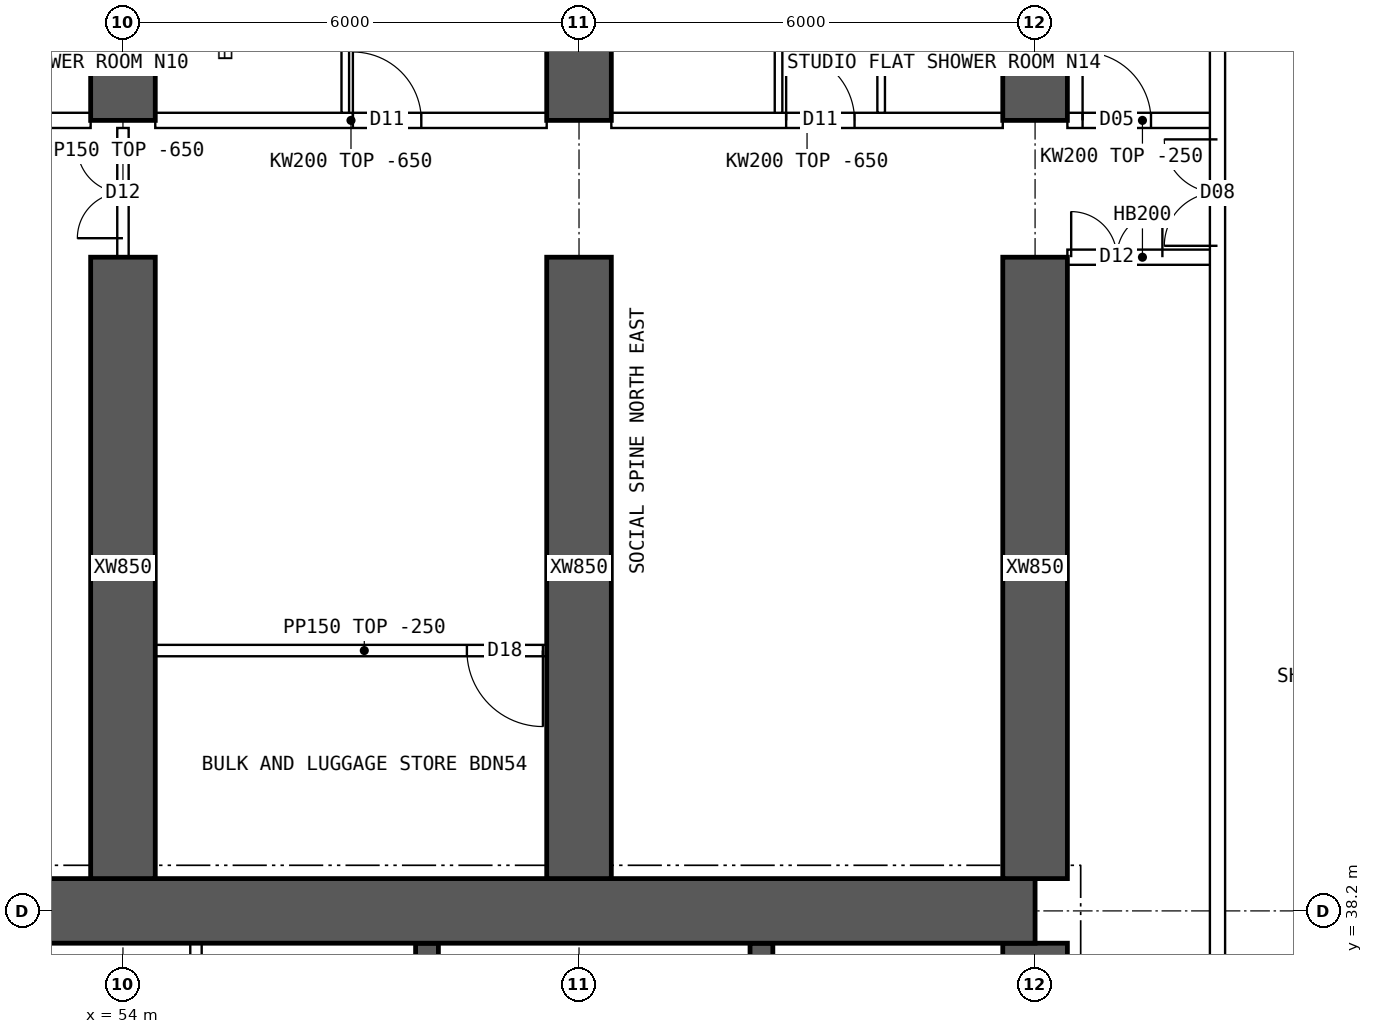
"""IFC4 building model, lengths in metres.
Left out: names, types, materials, properties, quantities, classifications, styles, units other than length and angle.
Written with IfcOpenShell. Run it as: python <this file> out.ifc"""

import sys

from ifc_helpers import new_model, si_unit, direction, frame, frame_2d, origin, place, context, subcontext, project, spatial, polyline, rectangle, outline, extrude, element, fill, save


model = new_model("IFC4")
c1 = context("Model", 3, precision=1e-05, world=origin(), true_north=direction((0.0, 1.0)))
c2 = subcontext(c1, "Body", "Model", "MODEL_VIEW")
j1 = project(units=[si_unit("LENGTHUNIT", "METRE"), si_unit("PLANEANGLEUNIT", "RADIAN")], contexts=[c1])
p1 = place(None, origin())
s1 = spatial("IfcSite", under=j1, at=p1, CompositionType="ELEMENT")
p2 = place(p1, origin())
s2 = spatial("IfcBuilding", under=s1, at=p2, CompositionType="ELEMENT")
p3 = place(p2, frame((0.0, 0.0, 186.1)))
s3 = spatial("IfcBuildingStorey", under=s2, at=p3, CompositionType="ELEMENT", Elevation=186.1)
p4 = place(p3, frame((18.0, 38.2, 0.0), z_axis=(0.0, 0.0, 1.0), x_axis=(1.0, 0.0, 0.0)))
e1 = element("IfcWall", 1, at=p4, inside=s3, PredefinedType="SHEAR", context=c2, shape_type="SweptSolid", body=[
    extrude(rectangle(XDim=48.0, YDim=0.85, at=frame_2d((24.0, 0.0))), origin(), (0.0, 0.0, 1.0), 3.75),
])
p5 = place(p3, frame((66.0, 26.225, 0.0), z_axis=(0.0, 0.0, 1.0), x_axis=(0.0, 1.0, 0.0)))
e2 = element("IfcWall", 2, at=p5, inside=s3, PredefinedType="SHEAR", context=c2, shape_type="SweptSolid", body=[
    extrude(rectangle(XDim=11.55, YDim=0.85, at=frame_2d((5.775, 0.0))), origin(), (0.0, 0.0, 1.0), 3.75),
])
p6 = place(p5, frame((5.075, 0.0, 0.0)))
e3 = element("IfcOpeningElement", 3, at=p6, cuts=e2, PredefinedType="OPENING", context=c2, shape_type="SweptSolid", body=[
    extrude(rectangle(XDim=1.2, YDim=2.1, at=frame_2d((0.6, 1.05))), frame((0.0, 0.435, 0.0), z_axis=(0.0, -1.0, 0.0), x_axis=(1.0, 0.0, 0.0)), (0.0, 0.0, 1.0), 0.87),
])
for number, where, z_axis, x_axis in (
    (4, (62.4, 34.75, 0.0), (0.0, 0.0, 1.0), (0.0, 1.0, 0.0)),
    (5, (58.0, 34.75, 0.0), (0.0, 0.0, 1.0), (0.0, 1.0, 0.0)),
):
    element("IfcWall", number, at=place(p3, frame(where, z_axis=z_axis, x_axis=x_axis)), inside=s3, PredefinedType="SHEAR", context=c2, shape_type="SweptSolid", body=[
        extrude(rectangle(XDim=3.025, YDim=0.3, at=frame_2d((1.512, 0.0))), origin(), (0.0, 0.0, 1.0), 3.75),
    ])
p7 = place(p3, frame((54.0, 48.6, 0.0), z_axis=(0.0, 0.0, 1.0), x_axis=(0.0, 1.0, 0.0)))
e6 = element("IfcWall", 6, at=p7, inside=s3, PredefinedType="SHEAR", context=c2, shape_type="SweptSolid", body=[
    extrude(rectangle(XDim=5.4, YDim=0.85, at=frame_2d((2.7, 0.0))), origin(), (0.0, 0.0, 1.0), 3.75),
])
p8 = place(p3, frame((54.0, 38.625, 0.0), z_axis=(0.0, 0.0, 1.0), x_axis=(0.0, 1.0, 0.0)))
e7 = element("IfcWall", 7, at=p8, inside=s3, PredefinedType="SHEAR", context=c2, shape_type="SweptSolid", body=[
    extrude(rectangle(XDim=8.175, YDim=0.85, at=frame_2d((4.087, 0.0))), origin(), (0.0, 0.0, 1.0), 3.75),
])
p9 = place(p3, frame((60.0, 48.6, 0.0), z_axis=(0.0, 0.0, 1.0), x_axis=(0.0, 1.0, 0.0)))
e8 = element("IfcWall", 8, at=p9, inside=s3, PredefinedType="SHEAR", context=c2, shape_type="SweptSolid", body=[
    extrude(rectangle(XDim=5.4, YDim=0.85, at=frame_2d((2.7, 0.0))), origin(), (0.0, 0.0, 1.0), 3.75),
])
p10 = place(p3, frame((60.0, 38.625, 0.0), z_axis=(0.0, 0.0, 1.0), x_axis=(0.0, 1.0, 0.0)))
e9 = element("IfcWall", 9, at=p10, inside=s3, PredefinedType="SHEAR", context=c2, shape_type="SweptSolid", body=[
    extrude(rectangle(XDim=8.175, YDim=0.85, at=frame_2d((4.087, 0.0))), origin(), (0.0, 0.0, 1.0), 3.75),
])
p11 = place(p3, frame((66.0, 48.6, 0.0), z_axis=(0.0, 0.0, 1.0), x_axis=(0.0, 1.0, 0.0)))
e10 = element("IfcWall", 10, at=p11, inside=s3, PredefinedType="SHEAR", context=c2, shape_type="SweptSolid", body=[
    extrude(rectangle(XDim=5.4, YDim=0.85, at=frame_2d((2.7, 0.0))), origin(), (0.0, 0.0, 1.0), 3.75),
])
p12 = place(p3, frame((66.0, 38.625, 0.0), z_axis=(0.0, 0.0, 1.0), x_axis=(0.0, 1.0, 0.0)))
e11 = element("IfcWall", 11, at=p12, inside=s3, PredefinedType="SHEAR", context=c2, shape_type="SweptSolid", body=[
    extrude(rectangle(XDim=8.175, YDim=0.85, at=frame_2d((4.087, 0.0))), origin(), (0.0, 0.0, 1.0), 3.75),
])
p13 = place(p3, frame((54.961, 34.75, 0.0), z_axis=(0.0, 0.0, 1.0), x_axis=(0.0, 1.0, 0.0)))
e12 = element("IfcWall", 12, at=p13, inside=s3, PredefinedType="SOLIDWALL", context=c2, shape_type="SweptSolid", body=[
    extrude(rectangle(XDim=3.025, YDim=0.15, at=frame_2d((1.512, 0.0))), origin(), (0.0, 0.0, 1.0), 3.5),
])
p14 = place(p3, frame((48.425, 48.6, 0.0), z_axis=(0.0, 0.0, 1.0), x_axis=(1.0, 0.0, 0.0)))
e13 = element("IfcWall", 13, at=p14, inside=s3, PredefinedType="SOLIDWALL", context=c2, shape_type="SweptSolid", body=[
    extrude(outline(polyline([(0.0, 0.0), (5.15, 0.0), (5.15, 3.1), (0.0, 3.1), (0.0, 0.0)])), frame((0.0, 0.1, 0.0), z_axis=(0.0, -1.0, 0.0), x_axis=(1.0, 0.0, 0.0)), (0.0, 0.0, 1.0), 0.2),
])
p15 = place(p14, frame((2.3, 0.0, 0.0)))
e14 = element("IfcOpeningElement", 14, at=p15, cuts=e13, PredefinedType="OPENING", context=c2, shape_type="SweptSolid", body=[
    extrude(rectangle(XDim=0.9, YDim=2.1, at=frame_2d((0.45, 1.05))), frame((0.0, 0.11, 0.0), z_axis=(0.0, -1.0, 0.0), x_axis=(1.0, 0.0, 0.0)), (0.0, 0.0, 1.0), 0.22),
])
p16 = place(p3, frame((54.425, 48.6, 0.0), z_axis=(0.0, 0.0, 1.0), x_axis=(1.0, 0.0, 0.0)))
e15 = element("IfcWall", 15, at=p16, inside=s3, PredefinedType="SOLIDWALL", context=c2, shape_type="SweptSolid", body=[
    extrude(outline(polyline([(0.0, 0.0), (5.15, 0.0), (5.15, 3.1), (0.0, 3.1), (0.0, 0.0)])), frame((0.0, 0.1, 0.0), z_axis=(0.0, -1.0, 0.0), x_axis=(1.0, 0.0, 0.0)), (0.0, 0.0, 1.0), 0.2),
])
p17 = place(p16, frame((2.6, 0.0, 0.0)))
e16 = element("IfcOpeningElement", 16, at=p17, cuts=e15, PredefinedType="OPENING", context=c2, shape_type="SweptSolid", body=[
    extrude(rectangle(XDim=0.9, YDim=2.1, at=frame_2d((0.45, 1.05))), frame((0.0, 0.11, 0.0), z_axis=(0.0, -1.0, 0.0), x_axis=(1.0, 0.0, 0.0)), (0.0, 0.0, 1.0), 0.22),
])
p18 = place(p3, frame((60.425, 48.6, 0.0), z_axis=(0.0, 0.0, 1.0), x_axis=(1.0, 0.0, 0.0)))
e17 = element("IfcWall", 17, at=p18, inside=s3, PredefinedType="SOLIDWALL", context=c2, shape_type="SweptSolid", body=[
    extrude(outline(polyline([(0.0, 0.0), (5.15, 0.0), (5.15, 3.1), (0.0, 3.1), (0.0, 0.0)])), frame((0.0, 0.1, 0.0), z_axis=(0.0, -1.0, 0.0), x_axis=(1.0, 0.0, 0.0)), (0.0, 0.0, 1.0), 0.2),
])
p19 = place(p18, frame((2.3, 0.0, 0.0)))
e18 = element("IfcOpeningElement", 18, at=p19, cuts=e17, PredefinedType="OPENING", context=c2, shape_type="SweptSolid", body=[
    extrude(rectangle(XDim=0.9, YDim=2.1, at=frame_2d((0.45, 1.05))), frame((0.0, 0.11, 0.0), z_axis=(0.0, -1.0, 0.0), x_axis=(1.0, 0.0, 0.0)), (0.0, 0.0, 1.0), 0.22),
])
p20 = place(p3, frame((66.425, 48.6, 0.0), z_axis=(0.0, 0.0, 1.0), x_axis=(1.0, 0.0, 0.0)))
e19 = element("IfcWall", 19, at=p20, inside=s3, PredefinedType="SOLIDWALL", context=c2, shape_type="SweptSolid", body=[
    extrude(rectangle(XDim=1.975, YDim=0.2, at=frame_2d((0.987, 0.0))), origin(), (0.0, 0.0, 1.0), 3.5),
])
p21 = place(p20, frame((0.2, 0.0, 0.0)))
e20 = element("IfcOpeningElement", 20, at=p21, cuts=e19, PredefinedType="OPENING", context=c2, shape_type="SweptSolid", body=[
    extrude(rectangle(XDim=0.9, YDim=2.1, at=frame_2d((0.45, 1.05))), frame((0.0, 0.11, 0.0), z_axis=(0.0, -1.0, 0.0), x_axis=(1.0, 0.0, 0.0)), (0.0, 0.0, 1.0), 0.22),
])
p22 = place(p3, frame((66.425, 46.8, 0.0), z_axis=(0.0, 0.0, 1.0), x_axis=(1.0, 0.0, 0.0)))
e21 = element("IfcWall", 21, at=p22, inside=s3, PredefinedType="SOLIDWALL", context=c2, shape_type="SweptSolid", body=[
    extrude(rectangle(XDim=1.975, YDim=0.2, at=frame_2d((0.987, 0.0))), origin(), (0.0, 0.0, 1.0), 3.5),
])
p23 = place(p22, frame((0.05, 0.0, 0.0)))
e22 = element("IfcOpeningElement", 22, at=p23, cuts=e21, PredefinedType="OPENING", context=c2, shape_type="SweptSolid", body=[
    extrude(rectangle(XDim=1.2, YDim=2.1, at=frame_2d((0.6, 1.05))), frame((0.0, 0.11, 0.0), z_axis=(0.0, -1.0, 0.0), x_axis=(1.0, 0.0, 0.0)), (0.0, 0.0, 1.0), 0.22),
])
p24 = place(p3, frame((56.925, 51.85, 0.0), z_axis=(0.0, 0.0, 1.0), x_axis=(0.0, -1.0, 0.0)))
e23 = element("IfcWall", 23, at=p24, inside=s3, PredefinedType="PARTITIONING", context=c2, shape_type="SweptSolid", body=[
    extrude(outline(polyline([(0.0, 0.0), (3.15, 0.0), (3.15, 3.1), (3.102, 3.1), (3.1, 3.5), (0.0, 3.5), (0.0, 0.0)])), frame((0.0, 0.05, 0.0), z_axis=(0.0, -1.0, 0.0), x_axis=(1.0, 0.0, 0.0)), (0.0, 0.0, 1.0), 0.1),
])
p25 = place(p3, frame((62.625, 51.05, 0.0), z_axis=(0.0, 0.0, 1.0), x_axis=(0.0, -1.0, 0.0)))
e24 = element("IfcWall", 24, at=p25, inside=s3, PredefinedType="PARTITIONING", context=c2, shape_type="SweptSolid", body=[
    extrude(outline(polyline([(0.0, 0.0), (2.35, 0.0), (2.35, 3.1), (2.302, 3.1), (2.3, 3.5), (0.0, 3.5), (0.0, 0.0)])), frame((0.0, 0.05, 0.0), z_axis=(0.0, -1.0, 0.0), x_axis=(1.0, 0.0, 0.0)), (0.0, 0.0, 1.0), 0.1),
])
p26 = place(p3, frame((63.975, 51.05, 0.0), z_axis=(0.0, 0.0, 1.0), x_axis=(0.0, -1.0, 0.0)))
e25 = element("IfcWall", 25, at=p26, inside=s3, PredefinedType="PARTITIONING", context=c2, shape_type="SweptSolid", body=[
    extrude(outline(polyline([(0.0, 0.0), (2.35, 0.0), (2.35, 3.1), (2.302, 3.1), (2.3, 3.5), (0.0, 3.5), (0.0, 0.0)])), frame((0.0, 0.05, 0.0), z_axis=(0.0, -1.0, 0.0), x_axis=(1.0, 0.0, 0.0)), (0.0, 0.0, 1.0), 0.1),
])
p27 = place(p26, frame((0.8, 0.0, 0.0)))
e26 = element("IfcOpeningElement", 26, at=p27, cuts=e25, PredefinedType="OPENING", context=c2, shape_type="SweptSolid", body=[
    extrude(rectangle(XDim=0.8, YDim=2.1, at=frame_2d((0.4, 1.05))), frame((0.0, 0.06, 0.0), z_axis=(0.0, -1.0, 0.0), x_axis=(1.0, 0.0, 0.0)), (0.0, 0.0, 1.0), 0.12),
])
p28 = place(p3, frame((59.925, 41.625, 0.0), z_axis=(0.0, 0.0, 1.0), x_axis=(-1.0, 0.0, 0.0)))
e27 = element("IfcWall", 27, at=p28, inside=s3, PredefinedType="PARTITIONING", context=c2, shape_type="SweptSolid", body=[
    extrude(rectangle(XDim=5.5, YDim=0.15, at=frame_2d((2.75, 0.0))), origin(), (0.0, 0.0, 1.0), 3.5),
])
p29 = place(p28, frame((0.4, 0.0, 0.0)))
e28 = element("IfcOpeningElement", 28, at=p29, cuts=e27, PredefinedType="OPENING", context=c2, shape_type="SweptSolid", body=[
    extrude(rectangle(XDim=1.0, YDim=2.1, at=frame_2d((0.5, 1.05))), frame((0.0, 0.085, 0.0), z_axis=(0.0, -1.0, 0.0), x_axis=(1.0, 0.0, 0.0)), (0.0, 0.0, 1.0), 0.17),
])
p30 = place(p3, frame((54.0, 46.8, 0.0), z_axis=(0.0, 0.0, 1.0), x_axis=(0.0, 1.0, 0.0)))
e29 = element("IfcWall", 29, at=p30, inside=s3, PredefinedType="PARTITIONING", context=c2, shape_type="SweptSolid", body=[
    extrude(outline(polyline([(0.0, 0.0), (1.7, 0.0), (1.7, 3.1), (0.0, 3.1), (0.0, 0.0)])), frame((0.0, 0.075, 0.0), z_axis=(0.0, -1.0, 0.0), x_axis=(1.0, 0.0, 0.0)), (0.0, 0.0, 1.0), 0.15),
])
p31 = place(p30, frame((0.25, 0.0, 0.0)))
e30 = element("IfcOpeningElement", 30, at=p31, cuts=e29, PredefinedType="OPENING", context=c2, shape_type="SweptSolid", body=[
    extrude(rectangle(XDim=1.2, YDim=2.1, at=frame_2d((0.6, 1.05))), frame((0.0, 0.085, 0.0), z_axis=(0.0, -1.0, 0.0), x_axis=(1.0, 0.0, 0.0)), (0.0, 0.0, 1.0), 0.17),
])
p32 = place(p3, frame((68.4, 10.446, 0.0), z_axis=(0.0, 0.0, 1.0), x_axis=(0.0, 1.0, 0.0)))
e31 = element("IfcWall", 31, at=p32, inside=s3, PredefinedType="SOLIDWALL", context=c2, shape_type="SweptSolid", body=[
    extrude(rectangle(XDim=43.107, YDim=0.2, at=frame_2d((21.554, 0.0))), origin(), (0.0, 0.0, 1.0), 3.5),
])
p33 = place(p32, frame((5.104, 0.0, 0.0)))
e32 = element("IfcOpeningElement", 32, at=p33, cuts=e31, PredefinedType="OPENING", context=c2, shape_type="SweptSolid", body=[
    extrude(rectangle(XDim=1.4, YDim=2.1, at=frame_2d((0.7, 1.05))), frame((0.0, 0.11, 0.0), z_axis=(0.0, -1.0, 0.0), x_axis=(1.0, 0.0, 0.0)), (0.0, 0.0, 1.0), 0.22),
])
p34 = place(p32, frame((36.504, 0.0, 0.0)))
e33 = element("IfcOpeningElement", 33, at=p34, cuts=e31, PredefinedType="OPENING", context=c2, shape_type="SweptSolid", body=[
    extrude(rectangle(XDim=1.4, YDim=2.1, at=frame_2d((0.7, 1.05))), frame((0.0, 0.11, 0.0), z_axis=(0.0, -1.0, 0.0), x_axis=(1.0, 0.0, 0.0)), (0.0, 0.0, 1.0), 0.22),
])
p35 = place(p23, origin())
e34 = element("IfcDoor", 34, at=p35, inside=s3, OperationType="DOUBLE_DOOR_SINGLE_SWING", PredefinedType="DOOR", context=c2, shape_type="SweptSolid", body=[
    extrude(rectangle(XDim=1.2, YDim=2.1, at=frame_2d((0.6, 1.05))), frame((0.0, 0.025, 0.0), z_axis=(0.0, -1.0, 0.0), x_axis=(1.0, 0.0, 0.0)), (0.0, 0.0, 1.0), 0.05),
])
fill(e22, e34)
p36 = place(p17, origin())
e35 = element("IfcDoor", 35, at=p36, inside=s3, OperationType="SINGLE_SWING_LEFT", PredefinedType="DOOR", context=c2, shape_type="SweptSolid", body=[
    extrude(rectangle(XDim=0.9, YDim=2.1, at=frame_2d((0.45, 1.05))), frame((0.0, 0.025, 0.0), z_axis=(0.0, -1.0, 0.0), x_axis=(1.0, 0.0, 0.0)), (0.0, 0.0, 1.0), 0.05),
])
fill(e16, e35)
p37 = place(p27, origin())
e36 = element("IfcDoor", 36, at=p37, inside=s3, OperationType="SINGLE_SWING_RIGHT", PredefinedType="DOOR", context=c2, shape_type="SweptSolid", body=[
    extrude(rectangle(XDim=0.8, YDim=2.1, at=frame_2d((0.4, 1.05))), frame((0.0, 0.025, 0.0), z_axis=(0.0, -1.0, 0.0), x_axis=(1.0, 0.0, 0.0)), (0.0, 0.0, 1.0), 0.05),
])
fill(e26, e36)
p38 = place(p19, origin())
e37 = element("IfcDoor", 37, at=p38, inside=s3, OperationType="SINGLE_SWING_LEFT", PredefinedType="DOOR", context=c2, shape_type="SweptSolid", body=[
    extrude(rectangle(XDim=0.9, YDim=2.1, at=frame_2d((0.45, 1.05))), frame((0.0, 0.025, 0.0), z_axis=(0.0, -1.0, 0.0), x_axis=(1.0, 0.0, 0.0)), (0.0, 0.0, 1.0), 0.05),
])
fill(e18, e37)
p39 = place(p29, origin())
e38 = element("IfcDoor", 38, at=p39, inside=s3, OperationType="SINGLE_SWING_LEFT", PredefinedType="DOOR", context=c2, shape_type="SweptSolid", body=[
    extrude(rectangle(XDim=1.0, YDim=2.1, at=frame_2d((0.5, 1.05))), frame((0.0, 0.025, 0.0), z_axis=(0.0, -1.0, 0.0), x_axis=(1.0, 0.0, 0.0)), (0.0, 0.0, 1.0), 0.05),
])
fill(e28, e38)
p40 = place(p31, origin())
e39 = element("IfcDoor", 39, at=p40, inside=s3, OperationType="DOUBLE_DOOR_SINGLE_SWING", PredefinedType="DOOR", context=c2, shape_type="SweptSolid", body=[
    extrude(rectangle(XDim=1.2, YDim=2.1, at=frame_2d((0.6, 1.05))), frame((0.0, 0.025, 0.0), z_axis=(0.0, -1.0, 0.0), x_axis=(1.0, 0.0, 0.0)), (0.0, 0.0, 1.0), 0.05),
])
fill(e30, e39)
p41 = place(p34, origin())
e40 = element("IfcDoor", 40, at=p41, inside=s3, OperationType="DOUBLE_DOOR_SINGLE_SWING", PredefinedType="DOOR", context=c2, shape_type="SweptSolid", body=[
    extrude(rectangle(XDim=1.4, YDim=2.1, at=frame_2d((0.7, 1.05))), frame((0.0, 0.025, 0.0), z_axis=(0.0, -1.0, 0.0), x_axis=(1.0, 0.0, 0.0)), (0.0, 0.0, 1.0), 0.05),
])
fill(e33, e40)
p42 = place(p21, origin())
e41 = element("IfcDoor", 41, at=p42, inside=s3, OperationType="SINGLE_SWING_LEFT", PredefinedType="DOOR", context=c2, shape_type="SweptSolid", body=[
    extrude(rectangle(XDim=0.9, YDim=2.1, at=frame_2d((0.45, 1.05))), frame((0.0, 0.025, 0.0), z_axis=(0.0, -1.0, 0.0), x_axis=(1.0, 0.0, 0.0)), (0.0, 0.0, 1.0), 0.05),
])
fill(e20, e41)
save(model, sys.argv[1])
